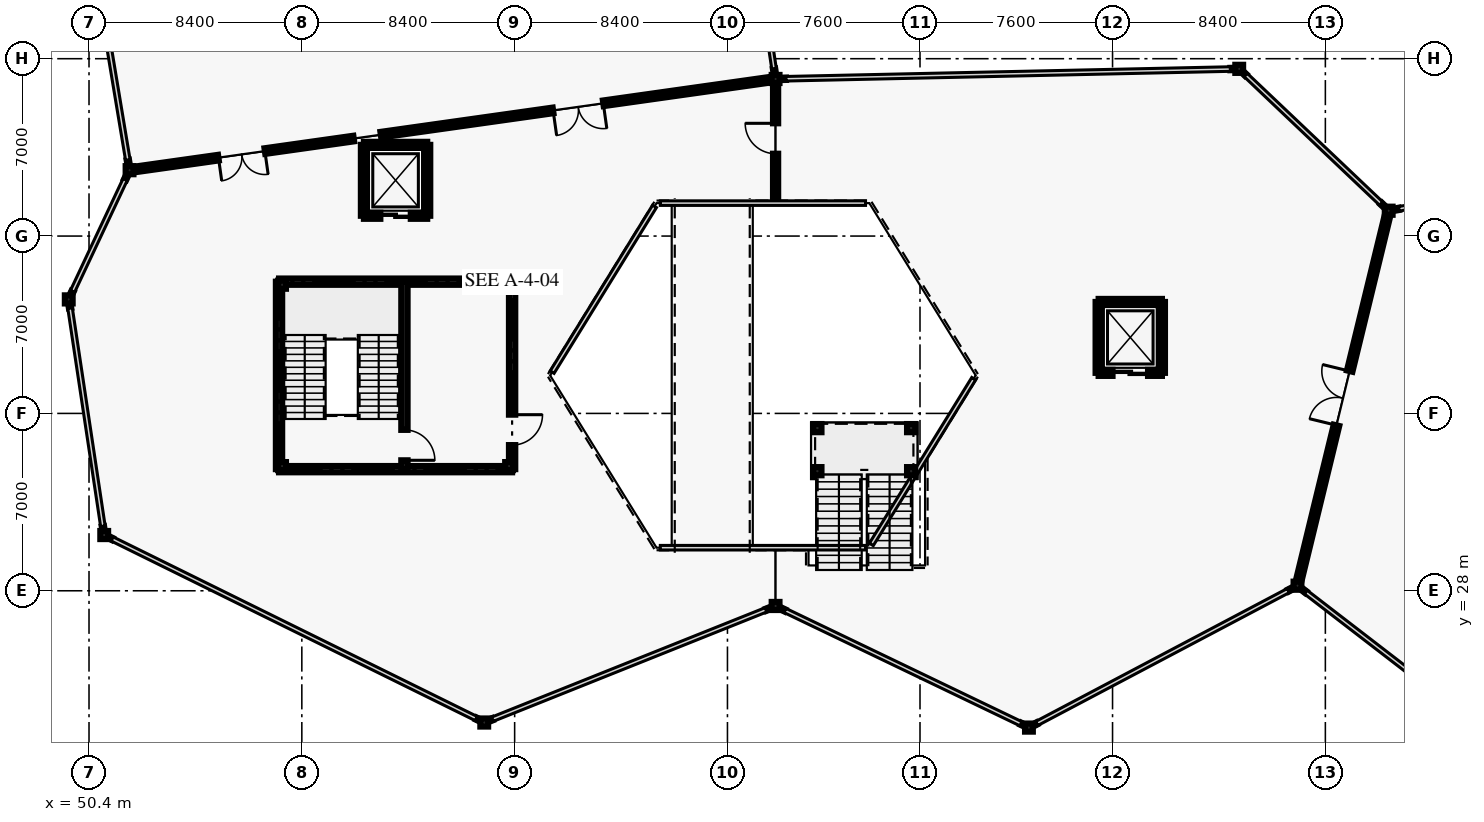
"""IFC4 building model, lengths in metres.
Left out: names, types, materials, properties, quantities, classifications, styles, units other than length and angle.
Written with IfcOpenShell. Run it as: python <this file> out.ifc"""

import sys

from ifc_helpers import new_model, si_unit, direction, frame, frame_2d, origin, origin_2d, place, context, subcontext, project, spatial, rectangle, hollow_circle, i_section, extrude, element, fill, save


model = new_model("IFC4")
c1 = context("Model", 3, precision=1e-05, world=origin(), true_north=direction((0.0, 1.0)))
c2 = subcontext(c1, "Body", "Model", "MODEL_VIEW")
j1 = project(units=[si_unit("LENGTHUNIT", "METRE"), si_unit("PLANEANGLEUNIT", "RADIAN")], contexts=[c1])
p1 = place(None, origin())
s1 = spatial("IfcSite", under=j1, at=p1, CompositionType="ELEMENT")
p2 = place(p1, origin())
s2 = spatial("IfcBuilding", under=s1, at=p2, CompositionType="ELEMENT")
p3 = place(p2, frame((0.0, 0.0, 15.0)))
s3 = spatial("IfcBuildingStorey", under=s2, at=p3, CompositionType="ELEMENT", Elevation=15.0)
for number, where, z_axis, x_axis in (
    (1, (49.6, 39.5, 0.0), (0.0, 0.0, 1.0), (1.0, 0.0, 0.0)),
    (2, (51.0, 30.2, 0.0), (0.0, 0.0, 1.0), (1.0, 0.0, 0.0)),
    (3, (52.0, 44.6, 0.0), (0.0, 0.0, 1.0), (1.0, 0.0, 0.0)),
    (4, (66.0, 22.8, 0.0), (0.0, 0.0, 1.0), (1.0, 0.0, 0.0)),
    (5, (77.5, 27.4, 0.0), (0.0, 0.0, 1.0), (1.0, 0.0, 0.0)),
    (6, (77.5, 48.2, 0.0), (0.0, 0.0, 1.0), (1.0, 0.0, 0.0)),
    (7, (87.5, 22.6, 0.0), (0.0, 0.0, 1.0), (1.0, 0.0, 0.0)),
    (8, (95.8, 48.6, 0.0), (0.0, 0.0, 1.0), (1.0, 0.0, 0.0)),
    (9, (98.1, 28.2, 0.0), (0.0, 0.0, 1.0), (1.0, 0.0, 0.0)),
    (10, (101.7, 43.0, 0.0), (0.0, 0.0, 1.0), (1.0, 0.0, 0.0)),
    (11, (58.02, 32.92, 0.0), (0.0, 0.0, 1.0), (1.0, 0.0, 0.0)),
    (12, (66.98, 32.92, 0.0), (0.0, 0.0, 1.0), (1.0, 0.0, 0.0)),
    (13, (66.98, 40.08, 0.0), (0.0, 0.0, 1.0), (1.0, 0.0, 0.0)),
    (14, (58.02, 40.08, 0.0), (0.0, 0.0, 1.0), (1.0, 0.0, 0.0)),
):
    element("IfcColumn", number, at=place(p3, frame(where, z_axis=z_axis, x_axis=x_axis)), inside=s3, PredefinedType="COLUMN", context=c2, shape_type="SweptSolid", body=[
        extrude(i_section(OverallWidth=0.309, OverallDepth=0.321, WebThickness=0.014, FlangeThickness=0.022, FilletRadius=0.017, at=origin_2d()), origin(), (0.0, 0.0, 1.0), 4.8),
    ])
for number, where, z_axis, x_axis in (
    (15, (50.994, 30.242, 0.0), (0.0, 0.0, 1.0), (-0.149, 0.989, 0.0)),
    (16, (49.652, 39.154, 0.0), (0.0, 0.0, 1.0), (-0.15, 0.989, 0.0)),
):
    element("IfcWall", number, at=place(p3, frame(where, z_axis=z_axis, x_axis=x_axis)), inside=s3, PredefinedType="SOLIDWALL", context=c2, shape_type="SweptSolid", body=[
        extrude(rectangle(XDim=0.307, YDim=0.095, at=frame_2d((0.154, 0.0))), origin(), (0.0, 0.0, 1.0), 3.62),
    ])
for number, where, z_axis, x_axis in (
    (17, (65.962, 22.819, 0.0), (0.0, 0.0, 1.0), (-0.897, 0.442, 0.0)),
    (18, (51.314, 30.045, 0.0), (0.0, 0.0, 1.0), (-0.897, 0.442, 0.0)),
):
    element("IfcWall", number, at=place(p3, frame(where, z_axis=z_axis, x_axis=x_axis)), inside=s3, PredefinedType="SOLIDWALL", context=c2, shape_type="SweptSolid", body=[
        extrude(rectangle(XDim=0.308, YDim=0.095, at=frame_2d((0.154, 0.0))), origin(), (0.0, 0.0, 1.0), 3.62),
    ])
p4 = place(p3, frame((77.405, 27.362, 0.0), z_axis=(0.0, 0.0, 1.0), x_axis=(-0.928967856381, -0.370160400111, 0.0)))
e19 = element("IfcWall", 19, at=p4, inside=s3, PredefinedType="SOLIDWALL", context=c2, shape_type="SweptSolid", body=[
    extrude(rectangle(XDim=0.308, YDim=0.095, at=frame_2d((0.154, 0.0))), origin(), (0.0, 0.0, 1.0), 3.62),
])
p5 = place(p3, frame((66.325, 22.93, 0.0), z_axis=(0.0, 0.0, 1.0), x_axis=(-0.928859130521, -0.370433145989, 0.0)))
e20 = element("IfcWall", 20, at=p5, inside=s3, PredefinedType="SOLIDWALL", context=c2, shape_type="SweptSolid", body=[
    extrude(rectangle(XDim=0.308, YDim=0.095, at=frame_2d((0.154, 0.0))), origin(), (0.0, 0.0, 1.0), 3.62),
])
p6 = place(p3, frame((49.618, 39.538, 0.0), z_axis=(0.0, 0.0, 1.0), x_axis=(0.425529884469, 0.904944372558, 0.0)))
e21 = element("IfcWall", 21, at=p6, inside=s3, PredefinedType="SOLIDWALL", context=c2, shape_type="SweptSolid", body=[
    extrude(rectangle(XDim=0.308, YDim=0.095, at=frame_2d((0.154, 0.0))), origin(), (0.0, 0.0, 1.0), 3.62),
])
p7 = place(p3, frame((51.825, 44.229, 0.0), z_axis=(0.0, 0.0, 1.0), x_axis=(0.425224932958, 0.905087706463, 0.0)))
e22 = element("IfcWall", 22, at=p7, inside=s3, PredefinedType="SOLIDWALL", context=c2, shape_type="SweptSolid", body=[
    extrude(rectangle(XDim=0.308, YDim=0.095, at=frame_2d((0.154, 0.0))), origin(), (0.0, 0.0, 1.0), 3.62),
])
p8 = place(p3, frame((87.462, 22.618, 0.0), z_axis=(0.0, 0.0, 1.0), x_axis=(-0.901906089125, 0.431932178008, 0.0)))
e23 = element("IfcWall", 23, at=p8, inside=s3, PredefinedType="SOLIDWALL", context=c2, shape_type="SweptSolid", body=[
    extrude(rectangle(XDim=0.308, YDim=0.095, at=frame_2d((0.154, 0.0))), origin(), (0.0, 0.0, 1.0), 3.62),
])
p9 = place(p3, frame((77.87, 27.223, 0.0), z_axis=(0.0, 0.0, 1.0), x_axis=(-0.902053790555, 0.431623631126, 0.0)))
e24 = element("IfcWall", 24, at=p9, inside=s3, PredefinedType="SOLIDWALL", context=c2, shape_type="SweptSolid", body=[
    extrude(rectangle(XDim=0.308, YDim=0.095, at=frame_2d((0.154, 0.0))), origin(), (0.0, 0.0, 1.0), 3.62),
])
p10 = place(p3, frame((98.01, 28.152, 0.0), z_axis=(0.0, 0.0, 1.0), x_axis=(-0.885021600209, -0.465549962049, 0.0)))
e25 = element("IfcWall", 25, at=p10, inside=s3, PredefinedType="SOLIDWALL", context=c2, shape_type="SweptSolid", body=[
    extrude(rectangle(XDim=0.307, YDim=0.095, at=frame_2d((0.154, 0.0))), origin(), (0.0, 0.0, 1.0), 3.62),
])
p11 = place(p3, frame((87.809, 22.763, 0.0), z_axis=(0.0, 0.0, 1.0), x_axis=(-0.885348834604, -0.464927350308, 0.0)))
e26 = element("IfcWall", 26, at=p11, inside=s3, PredefinedType="SOLIDWALL", context=c2, shape_type="SweptSolid", body=[
    extrude(rectangle(XDim=0.307, YDim=0.095, at=frame_2d((0.154, 0.0))), origin(), (0.0, 0.0, 1.0), 3.62),
])
for number, where, z_axis, x_axis in (
    (27, (95.83, 48.571, 0.0), (0.0, 0.0, 1.0), (0.726, -0.688, 0.0)),
    (28, (101.403, 43.282, 0.0), (0.0, 0.0, 1.0), (0.726, -0.687, 0.0)),
):
    element("IfcWall", number, at=place(p3, frame(where, z_axis=z_axis, x_axis=x_axis)), inside=s3, PredefinedType="SOLIDWALL", context=c2, shape_type="SweptSolid", body=[
        extrude(rectangle(XDim=0.308, YDim=0.095, at=frame_2d((0.154, 0.0))), origin(), (0.0, 0.0, 1.0), 3.62),
    ])
p12 = place(p3, frame((77.602, 48.202, 0.0), z_axis=(0.0, 0.0, 1.0), x_axis=(0.999735659566, 0.022991541735, 0.0)))
e29 = element("IfcWall", 29, at=p12, inside=s3, PredefinedType="SOLIDWALL", context=c2, shape_type="SweptSolid", body=[
    extrude(rectangle(XDim=0.308, YDim=0.095, at=frame_2d((0.154, 0.0))), origin(), (0.0, 0.0, 1.0), 3.62),
])
for number, where, z_axis, x_axis in (
    (30, (95.45, 48.592, 0.0), (0.0, 0.0, 1.0), (1.0, 0.023, 0.0)),
    (31, (51.983, 44.7, 0.0), (0.0, 0.0, 1.0), (-0.166, 0.986, 0.0)),
):
    element("IfcWall", number, at=place(p3, frame(where, z_axis=z_axis, x_axis=x_axis)), inside=s3, PredefinedType="SOLIDWALL", context=c2, shape_type="SweptSolid", body=[
        extrude(rectangle(XDim=0.308, YDim=0.095, at=frame_2d((0.154, 0.0))), origin(), (0.0, 0.0, 1.0), 3.62),
    ])
p13 = place(p3, frame((77.439, 48.605, 0.0), z_axis=(0.0, 0.0, 1.0), x_axis=(0.15008766182, -0.988672692942, 0.0)))
e32 = element("IfcWall", 32, at=p13, inside=s3, PredefinedType="SOLIDWALL", context=c2, shape_type="SweptSolid", body=[
    extrude(rectangle(XDim=0.307, YDim=0.095, at=frame_2d((0.154, 0.0))), origin(), (0.0, 0.0, 1.0), 3.62),
])
p14 = place(p3, frame((98.424, 27.95, 0.0), z_axis=(0.0, 0.0, 1.0), x_axis=(-0.793861838141, 0.608098168016, 0.0)))
e33 = element("IfcWall", 33, at=p14, inside=s3, PredefinedType="SOLIDWALL", context=c2, shape_type="SweptSolid", body=[
    extrude(rectangle(XDim=0.308, YDim=0.095, at=frame_2d((0.154, 0.0))), origin(), (0.0, 0.0, 1.0), 3.62),
])
p15 = place(p3, frame((101.8, 43.019, 0.0), z_axis=(0.0, 0.0, 1.0), x_axis=(0.983958590936, 0.178397004803, 0.0)))
e34 = element("IfcWall", 34, at=p15, inside=s3, PredefinedType="SOLIDWALL", context=c2, shape_type="SweptSolid", body=[
    extrude(rectangle(XDim=0.308, YDim=0.095, at=frame_2d((0.154, 0.0))), origin(), (0.0, 0.0, 1.0), 3.62),
])
p16 = place(p3, frame((77.5, 43.5, 0.0), z_axis=(0.0, 0.0, 1.0), x_axis=(0.0, 1.0, 0.0)))
e35 = element("IfcWall", 35, at=p16, inside=s3, PredefinedType="SOLIDWALL", context=c2, shape_type="SweptSolid", body=[
    extrude(rectangle(XDim=4.7, YDim=0.205, at=frame_2d((2.35, 0.0))), origin(), (0.0, 0.0, 1.0), 3.32),
])
p17 = place(p16, frame((1.75, 0.0, 0.0)))
e36 = element("IfcOpeningElement", 36, at=p17, cuts=e35, PredefinedType="OPENING", context=c2, shape_type="SweptSolid", body=[
    extrude(rectangle(XDim=1.2, YDim=2.2, at=frame_2d((0.6, 1.1))), frame((0.0, 0.113, 0.0), z_axis=(0.0, -1.0, 0.0), x_axis=(1.0, 0.0, 0.0)), (0.0, 0.0, 1.0), 0.225),
])
p18 = place(p3, frame((77.5, 48.2, 0.0), z_axis=(0.0, 0.0, 1.0), x_axis=(-0.990181159322, -0.139790098807, 0.0)))
e37 = element("IfcWall", 37, at=p18, inside=s3, PredefinedType="SOLIDWALL", context=c2, shape_type="SweptSolid", body=[
    extrude(rectangle(XDim=15.738, YDim=0.225, at=frame_2d((7.869, 0.0))), origin(), (0.0, 0.0, 1.0), 4.02),
])
p19 = place(p18, frame((6.869, 0.0, 0.0)))
e38 = element("IfcOpeningElement", 38, at=p19, cuts=e37, PredefinedType="OPENING", context=c2, shape_type="SweptSolid", body=[
    extrude(rectangle(XDim=2.0, YDim=2.5, at=frame_2d((1.0, 1.25))), frame((0.0, 0.123, 0.0), z_axis=(0.0, -1.0, 0.0), x_axis=(1.0, 0.0, 0.0)), (0.0, 0.0, 1.0), 0.245),
])
p20 = place(p3, frame((60.85, 45.849, 0.0), z_axis=(0.0, 0.0, 1.0), x_axis=(-0.990187360524, -0.139746166523, 0.0)))
e39 = element("IfcWall", 39, at=p20, inside=s3, PredefinedType="SOLIDWALL", context=c2, shape_type="SweptSolid", body=[
    extrude(rectangle(XDim=8.938, YDim=0.225, at=frame_2d((4.469, 0.0))), origin(), (0.0, 0.0, 1.0), 4.02),
])
p21 = place(p20, frame((3.544, 0.0, 0.0)))
e40 = element("IfcOpeningElement", 40, at=p21, cuts=e39, PredefinedType="OPENING", context=c2, shape_type="SweptSolid", body=[
    extrude(rectangle(XDim=1.85, YDim=2.4, at=frame_2d((0.925, 1.2))), frame((0.0, 0.123, 0.0), z_axis=(0.0, -1.0, 0.0), x_axis=(1.0, 0.0, 0.0)), (0.0, 0.0, 1.0), 0.245),
])
p22 = place(p3, frame((98.1, 28.2, 0.0), z_axis=(0.0, 0.0, 1.0), x_axis=(0.236341762997, 0.971669990822, 0.0)))
e41 = element("IfcWall", 41, at=p22, inside=s3, PredefinedType="SOLIDWALL", context=c2, shape_type="SweptSolid", body=[
    extrude(rectangle(XDim=15.231, YDim=0.225, at=frame_2d((7.616, 0.0))), origin(), (0.0, 0.0, 1.0), 4.02),
])
p23 = place(p22, frame((6.516, 0.0, 0.0)))
e42 = element("IfcOpeningElement", 42, at=p23, cuts=e41, PredefinedType="OPENING", context=c2, shape_type="SweptSolid", body=[
    extrude(rectangle(XDim=2.2, YDim=2.6, at=frame_2d((1.1, 1.3))), frame((0.0, 0.123, 0.0), z_axis=(0.0, -1.0, 0.0), x_axis=(1.0, 0.0, 0.0)), (0.0, 0.0, 1.0), 0.245),
])
p24 = place(p3, frame((57.9, 32.8, 0.0), z_axis=(0.0, 0.0, 1.0), x_axis=(0.0, 1.0, 0.0)))
e43 = element("IfcWall", 43, at=p24, inside=s3, PredefinedType="SHEAR", context=c2, shape_type="SweptSolid", body=[
    extrude(rectangle(XDim=7.4, YDim=0.25, at=frame_2d((3.7, 0.0))), origin(), (0.0, 0.0, 1.0), 4.56),
])
for number, where, z_axis, x_axis in (
    (44, (57.9, 40.2, 0.0), (0.0, 0.0, 1.0), (1.0, 0.0, 0.0)),
    (45, (67.1, 32.8, 0.0), (0.0, 0.0, 1.0), (-1.0, 0.0, 0.0)),
):
    element("IfcWall", number, at=place(p3, frame(where, z_axis=z_axis, x_axis=x_axis)), inside=s3, PredefinedType="SHEAR", context=c2, shape_type="SweptSolid", body=[
        extrude(rectangle(XDim=9.2, YDim=0.25, at=frame_2d((4.6, 0.0))), origin(), (0.0, 0.0, 1.0), 4.56),
    ])
p25 = place(p3, frame((67.1, 40.2, 0.0), z_axis=(0.0, 0.0, 1.0), x_axis=(0.0, -1.0, 0.0)))
e46 = element("IfcWall", 46, at=p25, inside=s3, PredefinedType="SHEAR", context=c2, shape_type="SweptSolid", body=[
    extrude(rectangle(XDim=7.4, YDim=0.25, at=frame_2d((3.7, 0.0))), origin(), (0.0, 0.0, 1.0), 4.56),
])
p26 = place(p25, frame((5.25, 0.0, 0.0)))
e47 = element("IfcOpeningElement", 47, at=p26, cuts=e46, PredefinedType="OPENING", context=c2, shape_type="SweptSolid", body=[
    extrude(rectangle(XDim=1.2, YDim=2.2, at=frame_2d((0.6, 1.1))), frame((0.0, 0.135, 0.0), z_axis=(0.0, -1.0, 0.0), x_axis=(1.0, 0.0, 0.0)), (0.0, 0.0, 1.0), 0.27),
])
p27 = place(p3, frame((62.85, 40.2, 0.0), z_axis=(0.0, 0.0, 1.0), x_axis=(0.0, -1.0, 0.0)))
e48 = element("IfcWall", 48, at=p27, inside=s3, PredefinedType="SHEAR", context=c2, shape_type="SweptSolid", body=[
    extrude(rectangle(XDim=7.4, YDim=0.25, at=frame_2d((3.7, 0.0))), origin(), (0.0, 0.0, 1.0), 4.56),
])
p28 = place(p27, frame((5.85, 0.0, 0.0)))
e49 = element("IfcOpeningElement", 49, at=p28, cuts=e48, PredefinedType="OPENING", context=c2, shape_type="SweptSolid", body=[
    extrude(rectangle(XDim=1.2, YDim=2.2, at=frame_2d((0.6, 1.1))), frame((0.0, 0.135, 0.0), z_axis=(0.0, -1.0, 0.0), x_axis=(1.0, 0.0, 0.0)), (0.0, 0.0, 1.0), 0.27),
])
for number, where, z_axis, x_axis in (
    (50, (79.15, 32.72, 0.0), (0.0, 0.0, 1.0), (1.0, 0.0, 0.0)),
    (51, (82.85, 32.72, 0.0), (0.0, 0.0, 1.0), (1.0, 0.0, 0.0)),
    (52, (79.15, 34.42, 0.0), (0.0, 0.0, 1.0), (1.0, 0.0, 0.0)),
    (53, (82.85, 34.42, 0.0), (0.0, 0.0, 1.0), (1.0, 0.0, 0.0)),
):
    element("IfcColumn", number, at=place(p3, frame(where, z_axis=z_axis, x_axis=x_axis)), inside=s3, PredefinedType="COLUMN", context=c2, shape_type="SweptSolid", body=[
        extrude(hollow_circle(Radius=0.162, WallThickness=0.01, at=origin_2d()), origin(), (0.0, 0.0, 1.0), 2.4),
    ])
p29 = place(p3, frame((61.25, 45.6, 0.0), z_axis=(0.0, 0.0, 1.0), x_axis=(1.0, 0.0, 0.0)))
e54 = element("IfcWall", 54, at=p29, inside=s3, PredefinedType="SHEAR", context=c2, shape_type="SweptSolid", body=[
    extrude(rectangle(XDim=2.5, YDim=0.24, at=frame_2d((1.25, 0.0))), origin(), (0.0, 0.0, 1.0), 4.56),
])
for number, where, z_axis, x_axis in (
    (55, (63.75, 45.6, 0.0), (0.0, 0.0, 1.0), (0.0, -1.0, 0.0)),
    (56, (61.25, 42.8, 0.0), (0.0, 0.0, 1.0), (0.0, 1.0, 0.0)),
):
    element("IfcWall", number, at=place(p3, frame(where, z_axis=z_axis, x_axis=x_axis)), inside=s3, PredefinedType="SHEAR", context=c2, shape_type="SweptSolid", body=[
        extrude(rectangle(XDim=2.8, YDim=0.24, at=frame_2d((1.4, 0.0))), origin(), (0.0, 0.0, 1.0), 4.56),
    ])
p30 = place(p3, frame((63.75, 42.8, 0.0), z_axis=(0.0, 0.0, 1.0), x_axis=(-1.0, 0.0, 0.0)))
e57 = element("IfcWall", 57, at=p30, inside=s3, PredefinedType="SHEAR", context=c2, shape_type="SweptSolid", body=[
    extrude(rectangle(XDim=2.5, YDim=0.24, at=frame_2d((1.25, 0.0))), origin(), (0.0, 0.0, 1.0), 4.56),
])
p31 = place(p30, frame((0.65, 0.0, 0.0)))
e58 = element("IfcOpeningElement", 58, at=p31, cuts=e57, PredefinedType="OPENING", context=c2, shape_type="SweptSolid", body=[
    extrude(rectangle(XDim=1.2, YDim=2.2, at=frame_2d((0.6, 1.1))), frame((0.0, 0.13, 0.0), z_axis=(0.0, -1.0, 0.0), x_axis=(1.0, 0.0, 0.0)), (0.0, 0.0, 1.0), 0.26),
])
p32 = place(p3, frame((90.25, 39.4, 0.0), z_axis=(0.0, 0.0, 1.0), x_axis=(1.0, 0.0, 0.0)))
e59 = element("IfcWall", 59, at=p32, inside=s3, PredefinedType="SHEAR", context=c2, shape_type="SweptSolid", body=[
    extrude(rectangle(XDim=2.5, YDim=0.24, at=frame_2d((1.25, 0.0))), origin(), (0.0, 0.0, 1.0), 4.56),
])
for number, where, z_axis, x_axis in (
    (60, (92.75, 39.4, 0.0), (0.0, 0.0, 1.0), (0.0, -1.0, 0.0)),
    (61, (90.25, 36.6, 0.0), (0.0, 0.0, 1.0), (0.0, 1.0, 0.0)),
):
    element("IfcWall", number, at=place(p3, frame(where, z_axis=z_axis, x_axis=x_axis)), inside=s3, PredefinedType="SHEAR", context=c2, shape_type="SweptSolid", body=[
        extrude(rectangle(XDim=2.8, YDim=0.24, at=frame_2d((1.4, 0.0))), origin(), (0.0, 0.0, 1.0), 4.56),
    ])
p33 = place(p3, frame((92.75, 36.6, 0.0), z_axis=(0.0, 0.0, 1.0), x_axis=(-1.0, 0.0, 0.0)))
e62 = element("IfcWall", 62, at=p33, inside=s3, PredefinedType="SHEAR", context=c2, shape_type="SweptSolid", body=[
    extrude(rectangle(XDim=2.5, YDim=0.24, at=frame_2d((1.25, 0.0))), origin(), (0.0, 0.0, 1.0), 4.56),
])
p34 = place(p33, frame((0.55, 0.0, 0.0)))
e63 = element("IfcOpeningElement", 63, at=p34, cuts=e62, PredefinedType="OPENING", context=c2, shape_type="SweptSolid", body=[
    extrude(rectangle(XDim=1.4, YDim=2.3, at=frame_2d((0.7, 1.15))), frame((0.0, 0.13, 0.0), z_axis=(0.0, -1.0, 0.0), x_axis=(1.0, 0.0, 0.0)), (0.0, 0.0, 1.0), 0.26),
])
p35 = place(p17, origin())
e64 = element("IfcDoor", 64, at=p35, inside=s3, OperationType="SINGLE_SWING_RIGHT", PredefinedType="DOOR", context=c2, shape_type="SweptSolid", body=[
    extrude(rectangle(XDim=1.2, YDim=2.2, at=frame_2d((0.6, 1.1))), frame((0.0, 0.025, 0.0), z_axis=(0.0, -1.0, 0.0), x_axis=(1.0, 0.0, 0.0)), (0.0, 0.0, 1.0), 0.05),
])
fill(e36, e64)
p36 = place(p19, origin())
e65 = element("IfcDoor", 65, at=p36, inside=s3, OperationType="DOUBLE_DOOR_SINGLE_SWING", PredefinedType="DOOR", context=c2, shape_type="SweptSolid", body=[
    extrude(rectangle(XDim=2.0, YDim=2.5, at=frame_2d((1.0, 1.25))), frame((0.0, 0.025, 0.0), z_axis=(0.0, -1.0, 0.0), x_axis=(1.0, 0.0, 0.0)), (0.0, 0.0, 1.0), 0.05),
])
fill(e38, e65)
p37 = place(p21, origin())
e66 = element("IfcDoor", 66, at=p37, inside=s3, OperationType="DOUBLE_DOOR_SINGLE_SWING", PredefinedType="DOOR", context=c2, shape_type="SweptSolid", body=[
    extrude(rectangle(XDim=1.85, YDim=2.4, at=frame_2d((0.925, 1.2))), frame((0.0, 0.025, 0.0), z_axis=(0.0, -1.0, 0.0), x_axis=(1.0, 0.0, 0.0)), (0.0, 0.0, 1.0), 0.05),
])
fill(e40, e66)
p38 = place(p23, origin())
e67 = element("IfcDoor", 67, at=p38, inside=s3, OperationType="DOUBLE_DOOR_SINGLE_SWING", PredefinedType="DOOR", context=c2, shape_type="SweptSolid", body=[
    extrude(rectangle(XDim=2.2, YDim=2.6, at=frame_2d((1.1, 1.3))), frame((0.0, 0.025, 0.0), z_axis=(0.0, -1.0, 0.0), x_axis=(1.0, 0.0, 0.0)), (0.0, 0.0, 1.0), 0.05),
])
fill(e42, e67)
p39 = place(p26, origin())
e68 = element("IfcDoor", 68, at=p39, inside=s3, OperationType="SINGLE_SWING_LEFT", PredefinedType="DOOR", context=c2, shape_type="SweptSolid", body=[
    extrude(rectangle(XDim=1.2, YDim=2.2, at=frame_2d((0.6, 1.1))), frame((0.0, 0.025, 0.0), z_axis=(0.0, -1.0, 0.0), x_axis=(1.0, 0.0, 0.0)), (0.0, 0.0, 1.0), 0.05),
])
fill(e47, e68)
p40 = place(p28, origin())
e69 = element("IfcDoor", 69, at=p40, inside=s3, OperationType="SINGLE_SWING_RIGHT", PredefinedType="DOOR", context=c2, shape_type="SweptSolid", body=[
    extrude(rectangle(XDim=1.2, YDim=2.2, at=frame_2d((0.6, 1.1))), frame((0.0, 0.025, 0.0), z_axis=(0.0, -1.0, 0.0), x_axis=(1.0, 0.0, 0.0)), (0.0, 0.0, 1.0), 0.05),
])
fill(e49, e69)
p41 = place(p31, origin())
e70 = element("IfcDoor", 70, at=p41, inside=s3, OperationType="SLIDING_TO_LEFT", PredefinedType="DOOR", context=c2, shape_type="SweptSolid", body=[
    extrude(rectangle(XDim=1.2, YDim=2.2, at=frame_2d((0.6, 1.1))), frame((0.0, 0.025, 0.0), z_axis=(0.0, -1.0, 0.0), x_axis=(1.0, 0.0, 0.0)), (0.0, 0.0, 1.0), 0.05),
])
fill(e58, e70)
p42 = place(p34, origin())
e71 = element("IfcDoor", 71, at=p42, inside=s3, OperationType="SLIDING_TO_LEFT", PredefinedType="DOOR", context=c2, shape_type="SweptSolid", body=[
    extrude(rectangle(XDim=1.4, YDim=2.3, at=frame_2d((0.7, 1.15))), frame((0.0, 0.025, 0.0), z_axis=(0.0, -1.0, 0.0), x_axis=(1.0, 0.0, 0.0)), (0.0, 0.0, 1.0), 0.05),
])
fill(e63, e71)
save(model, sys.argv[1])
